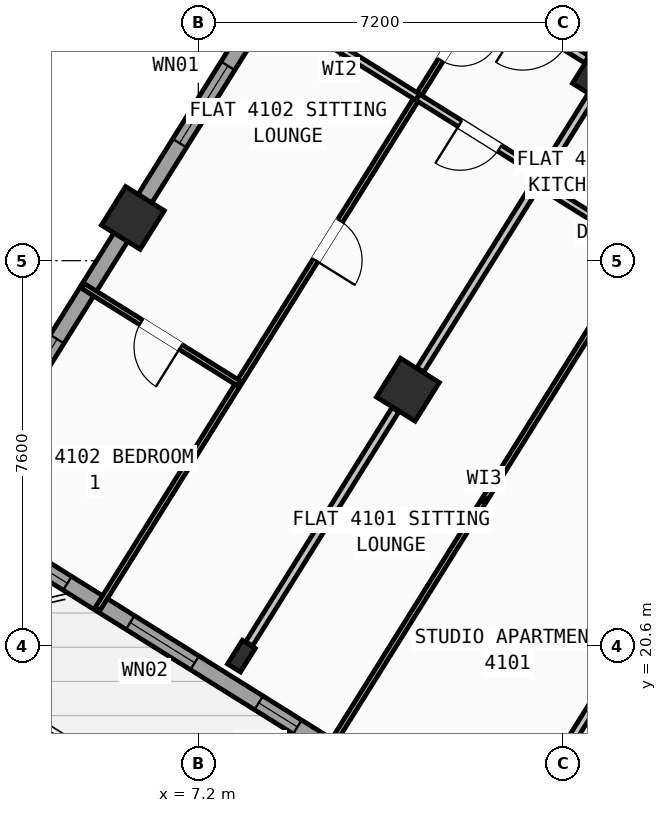
"""IFC4 building model, lengths in metres.
Left out: names, types, materials, properties, quantities, classifications, styles, units other than length and angle.
Written with IfcOpenShell. Run it as: python <this file> out.ifc"""

import sys

from ifc_helpers import new_model, si_unit, direction, frame, frame_2d, origin, origin_2d, place, context, subcontext, project, spatial, rectangle, hollow_rectangle, i_section, extrude, source, transform, mapped, element, fill, save


model = new_model("IFC4")
c1 = context("Model", 3, precision=1e-05, world=origin(), true_north=direction((0.0, 1.0)))
c2 = subcontext(c1, "Body", "Model", "MODEL_VIEW")
j1 = project(units=[si_unit("LENGTHUNIT", "METRE"), si_unit("PLANEANGLEUNIT", "RADIAN")], contexts=[c1])
p1 = place(None, origin())
s1 = spatial("IfcSite", under=j1, at=p1, CompositionType="ELEMENT")
p2 = place(p1, origin())
s2 = spatial("IfcBuilding", under=s1, at=p2, CompositionType="ELEMENT")
p3 = place(p2, frame((0.0, 0.0, 162.3)))
s3 = spatial("IfcBuildingStorey", under=s2, at=p3, CompositionType="ELEMENT", Elevation=162.3)
m1 = source(origin(), c2, "Body", "SweptSolid", [
    extrude(hollow_rectangle(XDim=0.9, YDim=0.9, WallThickness=0.036, at=origin_2d()), origin(), (0.0, 0.0, 1.0), 3.6),
])
for number, where, z_axis, x_axis in (
    (1, (15.205, 31.844, 0.0), (0.0, 0.0, 1.0), (-0.848, 0.53, 0.0)),
    (2, (11.336, 25.653, 0.0), (0.0, 0.0, 1.0), (-0.848, 0.53, 0.0)),
):
    element("IfcColumn", number, at=place(p3, frame(where, z_axis=z_axis, x_axis=x_axis)), inside=s3, PredefinedType="COLUMN", context=c2, shape_type="MappedRepresentation", body=[
        mapped(m1, transform((0.0, 0.0, 0.0), scale=1.0)),
    ])
m2 = source(origin(), c2, "Body", "SweptSolid", [
    extrude(i_section(OverallWidth=0.3, OverallDepth=0.55, WebThickness=0.015, FlangeThickness=0.029, at=origin_2d()), origin(), (0.0, 0.0, 1.0), 3.6),
])
p4 = place(p3, frame((8.051, 20.395, 0.0), z_axis=(0.0, 0.0, 1.0), x_axis=(-0.848048096156, 0.529919264233, 0.0)))
e3 = element("IfcColumn", 3, at=p4, inside=s3, PredefinedType="COLUMN", context=c2, shape_type="MappedRepresentation", body=[
    mapped(m2, transform((0.0, 0.0, 0.0), scale=1.0)),
])
p5 = place(p3, frame((5.909, 29.044, 0.0), z_axis=(0.0, 0.0, 1.0), x_axis=(-0.848048096156, 0.529919264233, 0.0)))
e4 = element("IfcColumn", 4, at=p5, inside=s3, PredefinedType="COLUMN", context=c2, shape_type="MappedRepresentation", body=[
    mapped(m1, transform((0.0, 0.0, 0.0), scale=1.0)),
])
p6 = place(p3, frame((29.268, 6.429, 0.0), z_axis=(0.0, 0.0, 1.0), x_axis=(-0.848049971435, 0.529916263149, 0.0)))
e5 = element("IfcWall", 5, at=p6, inside=s3, PredefinedType="STANDARD", context=c2, shape_type="SweptSolid", body=[
    extrude(rectangle(XDim=31.588, YDim=0.32, at=frame_2d((15.794, 0.0))), origin(), (0.0, 0.0, 1.0), 3.35),
])
p7 = place(p6, frame((16.362, 0.0, 0.0)))
e6 = element("IfcOpeningElement", 6, at=p7, cuts=e5, PredefinedType="OPENING", context=c2, shape_type="SweptSolid", body=[
    extrude(rectangle(XDim=1.2, YDim=2.15, at=frame_2d((0.6, 1.075))), frame((0.0, 0.17, 0.0), z_axis=(0.0, -1.0, 0.0), x_axis=(1.0, 0.0, 0.0)), (0.0, 0.0, 1.0), 0.34),
])
p8 = place(p6, frame((2.989, 0.0, 0.8)))
e7 = element("IfcOpeningElement", 7, at=p8, cuts=e5, PredefinedType="OPENING", context=c2, shape_type="SweptSolid", body=[
    extrude(rectangle(XDim=2.1, YDim=1.55, at=frame_2d((1.05, 0.775))), frame((0.0, 0.17, 0.0), z_axis=(0.0, -1.0, 0.0), x_axis=(1.0, 0.0, 0.0)), (0.0, 0.0, 1.0), 0.34),
])
p9 = place(p6, frame((8.359, 0.0, 0.8)))
e8 = element("IfcOpeningElement", 8, at=p9, cuts=e5, PredefinedType="OPENING", context=c2, shape_type="SweptSolid", body=[
    extrude(rectangle(XDim=2.1, YDim=1.55, at=frame_2d((1.05, 0.775))), frame((0.0, 0.17, 0.0), z_axis=(0.0, -1.0, 0.0), x_axis=(1.0, 0.0, 0.0)), (0.0, 0.0, 1.0), 0.34),
])
p10 = place(p6, frame((13.284, 0.0, 0.95)))
e9 = element("IfcOpeningElement", 9, at=p10, cuts=e5, PredefinedType="OPENING", context=c2, shape_type="SweptSolid", body=[
    extrude(rectangle(XDim=1.2, YDim=1.4, at=frame_2d((0.6, 0.7))), frame((0.0, 0.17, 0.0), z_axis=(0.0, -1.0, 0.0), x_axis=(1.0, 0.0, 0.0)), (0.0, 0.0, 1.0), 0.34),
])
p11 = place(p6, frame((20.39, 0.0, 0.95)))
e10 = element("IfcOpeningElement", 10, at=p11, cuts=e5, PredefinedType="OPENING", context=c2, shape_type="SweptSolid", body=[
    extrude(rectangle(XDim=1.2, YDim=1.4, at=frame_2d((0.6, 0.7))), frame((0.0, 0.17, 0.0), z_axis=(0.0, -1.0, 0.0), x_axis=(1.0, 0.0, 0.0)), (0.0, 0.0, 1.0), 0.34),
])
p12 = place(p6, frame((23.715, 0.0, 1.0)))
e11 = element("IfcOpeningElement", 11, at=p12, cuts=e5, PredefinedType="OPENING", context=c2, shape_type="SweptSolid", body=[
    extrude(rectangle(XDim=0.9, YDim=1.25, at=frame_2d((0.45, 0.625))), frame((0.0, 0.17, 0.0), z_axis=(0.0, -1.0, 0.0), x_axis=(1.0, 0.0, 0.0)), (0.0, 0.0, 1.0), 0.34),
])
p13 = place(p6, frame((26.106, 0.0, 0.85)))
e12 = element("IfcOpeningElement", 12, at=p13, cuts=e5, PredefinedType="OPENING", context=c2, shape_type="SweptSolid", body=[
    extrude(rectangle(XDim=1.5, YDim=1.5, at=frame_2d((0.75, 0.75))), frame((0.0, 0.17, 0.0), z_axis=(0.0, -1.0, 0.0), x_axis=(1.0, 0.0, 0.0)), (0.0, 0.0, 1.0), 0.34),
])
p14 = place(p6, frame((29.068, 0.0, 0.85)))
e13 = element("IfcOpeningElement", 13, at=p14, cuts=e5, PredefinedType="OPENING", context=c2, shape_type="SweptSolid", body=[
    extrude(rectangle(XDim=1.8, YDim=1.5, at=frame_2d((0.9, 0.75))), frame((0.0, 0.17, 0.0), z_axis=(0.0, -1.0, 0.0), x_axis=(1.0, 0.0, 0.0)), (0.0, 0.0, 1.0), 0.34),
])
p15 = place(p3, frame((2.415, 23.452, 0.0), z_axis=(0.0, 0.0, 1.0), x_axis=(0.52991049553, 0.848053575387, 0.0)))
e14 = element("IfcWall", 14, at=p15, inside=s3, PredefinedType="STANDARD", context=c2, shape_type="SweptSolid", body=[
    extrude(rectangle(XDim=21.587, YDim=0.32, at=frame_2d((10.794, 0.0))), origin(), (0.0, 0.0, 1.0), 2.775),
])
p16 = place(p15, frame((1.673, 0.0, 0.8)))
e15 = element("IfcOpeningElement", 15, at=p16, cuts=e14, PredefinedType="OPENING", context=c2, shape_type="SweptSolid", body=[
    extrude(rectangle(XDim=2.1, YDim=1.55, at=frame_2d((1.05, 0.775))), frame((0.0, 0.17, 0.0), z_axis=(0.0, -1.0, 0.0), x_axis=(1.0, 0.0, 0.0)), (0.0, 0.0, 1.0), 0.34),
])
p17 = place(p15, frame((8.334, 0.0, 0.85)))
e16 = element("IfcOpeningElement", 16, at=p17, cuts=e14, PredefinedType="OPENING", context=c2, shape_type="SweptSolid", body=[
    extrude(rectangle(XDim=1.8, YDim=1.5, at=frame_2d((0.9, 0.75))), frame((0.0, 0.17, 0.0), z_axis=(0.0, -1.0, 0.0), x_axis=(1.0, 0.0, 0.0)), (0.0, 0.0, 1.0), 0.34),
])
p18 = place(p15, frame((17.172, 0.0, 0.85)))
e17 = element("IfcOpeningElement", 17, at=p18, cuts=e14, PredefinedType="OPENING", context=c2, shape_type="SweptSolid", body=[
    extrude(rectangle(XDim=1.5, YDim=1.5, at=frame_2d((0.75, 0.75))), frame((0.0, 0.17, 0.0), z_axis=(0.0, -1.0, 0.0), x_axis=(1.0, 0.0, 0.0)), (0.0, 0.0, 1.0), 0.34),
])
p19 = place(p3, frame((14.138, 41.825, 0.0), z_axis=(0.0, 0.0, 1.0), x_axis=(0.848046498049, -0.529921821731, 0.0)))
e18 = element("IfcWall", 18, at=p19, inside=s3, PredefinedType="STANDARD", context=c2, shape_type="SweptSolid", body=[
    extrude(rectangle(XDim=31.588, YDim=0.32, at=frame_2d((15.794, 0.0))), origin(), (0.0, 0.0, 1.0), 3.35),
])
p20 = place(p19, frame((3.253, 0.0, 0.0)))
e19 = element("IfcOpeningElement", 19, at=p20, cuts=e18, PredefinedType="OPENING", context=c2, shape_type="SweptSolid", body=[
    extrude(rectangle(XDim=1.05, YDim=2.15, at=frame_2d((0.525, 1.075))), frame((0.0, 0.17, 0.0), z_axis=(0.0, -1.0, 0.0), x_axis=(1.0, 0.0, 0.0)), (0.0, 0.0, 1.0), 0.34),
])
p21 = place(p19, frame((0.863, 0.0, 0.85)))
e20 = element("IfcOpeningElement", 20, at=p21, cuts=e18, PredefinedType="OPENING", context=c2, shape_type="SweptSolid", body=[
    extrude(rectangle(XDim=1.8, YDim=1.5, at=frame_2d((0.9, 0.75))), frame((0.0, 0.17, 0.0), z_axis=(0.0, -1.0, 0.0), x_axis=(1.0, 0.0, 0.0)), (0.0, 0.0, 1.0), 0.34),
])
p22 = place(p19, frame((8.494, 0.0, 0.85)))
e21 = element("IfcOpeningElement", 21, at=p22, cuts=e18, PredefinedType="OPENING", context=c2, shape_type="SweptSolid", body=[
    extrude(rectangle(XDim=1.8, YDim=1.5, at=frame_2d((0.9, 0.75))), frame((0.0, 0.17, 0.0), z_axis=(0.0, -1.0, 0.0), x_axis=(1.0, 0.0, 0.0)), (0.0, 0.0, 1.0), 0.34),
])
p23 = place(p19, frame((13.874, 0.0, 0.85)))
e22 = element("IfcOpeningElement", 22, at=p23, cuts=e18, PredefinedType="OPENING", context=c2, shape_type="SweptSolid", body=[
    extrude(rectangle(XDim=1.5, YDim=1.5, at=frame_2d((0.75, 0.75))), frame((0.0, 0.17, 0.0), z_axis=(0.0, -1.0, 0.0), x_axis=(1.0, 0.0, 0.0)), (0.0, 0.0, 1.0), 0.34),
])
p24 = place(p19, frame((17.104, 0.0, 1.0)))
e23 = element("IfcOpeningElement", 23, at=p24, cuts=e18, PredefinedType="OPENING", context=c2, shape_type="SweptSolid", body=[
    extrude(rectangle(XDim=0.9, YDim=1.25, at=frame_2d((0.45, 0.625))), frame((0.0, 0.17, 0.0), z_axis=(0.0, -1.0, 0.0), x_axis=(1.0, 0.0, 0.0)), (0.0, 0.0, 1.0), 0.34),
])
p25 = place(p19, frame((22.144, 0.0, 1.0)))
e24 = element("IfcOpeningElement", 24, at=p25, cuts=e18, PredefinedType="OPENING", context=c2, shape_type="SweptSolid", body=[
    extrude(rectangle(XDim=0.9, YDim=1.25, at=frame_2d((0.45, 0.625))), frame((0.0, 0.17, 0.0), z_axis=(0.0, -1.0, 0.0), x_axis=(1.0, 0.0, 0.0)), (0.0, 0.0, 1.0), 0.34),
])
p26 = place(p19, frame((27.744, 0.0, 1.0)))
e25 = element("IfcOpeningElement", 25, at=p26, cuts=e18, PredefinedType="OPENING", context=c2, shape_type="SweptSolid", body=[
    extrude(rectangle(XDim=0.9, YDim=1.25, at=frame_2d((0.45, 0.625))), frame((0.0, 0.17, 0.0), z_axis=(0.0, -1.0, 0.0), x_axis=(1.0, 0.0, 0.0)), (0.0, 0.0, 1.0), 0.34),
])
p27 = place(p3, frame((25.065, 28.394, 0.0), z_axis=(0.0, 0.0, 1.0), x_axis=(-0.848048310262, 0.529918921593, 0.0)))
e26 = element("IfcWall", 26, at=p27, inside=s3, PredefinedType="PARTITIONING", context=c2, shape_type="SweptSolid", body=[
    extrude(rectangle(XDim=16.73, YDim=0.16, at=frame_2d((8.365, 0.0))), origin(), (0.0, 0.0, 1.0), 3.34),
])
p28 = place(p27, frame((2.22, 0.0, 0.0)))
e27 = element("IfcOpeningElement", 27, at=p28, cuts=e26, PredefinedType="OPENING", context=c2, shape_type="SweptSolid", body=[
    extrude(rectangle(XDim=0.86, YDim=2.05, at=frame_2d((0.43, 1.025))), frame((0.0, 0.09, 0.0), z_axis=(0.0, -1.0, 0.0), x_axis=(1.0, 0.0, 0.0)), (0.0, 0.0, 1.0), 0.18),
])
p29 = place(p27, frame((7.82, 0.0, 0.0)))
e28 = element("IfcOpeningElement", 28, at=p29, cuts=e26, PredefinedType="OPENING", context=c2, shape_type="SweptSolid", body=[
    extrude(rectangle(XDim=1.0, YDim=2.1, at=frame_2d((0.5, 1.05))), frame((0.0, 0.09, 0.0), z_axis=(0.0, -1.0, 0.0), x_axis=(1.0, 0.0, 0.0)), (0.0, 0.0, 1.0), 0.18),
])
p30 = place(p27, frame((12.95, 0.0, 0.0)))
e29 = element("IfcOpeningElement", 29, at=p30, cuts=e26, PredefinedType="OPENING", context=c2, shape_type="SweptSolid", body=[
    extrude(rectangle(XDim=1.0, YDim=2.1, at=frame_2d((0.5, 1.05))), frame((0.0, 0.09, 0.0), z_axis=(0.0, -1.0, 0.0), x_axis=(1.0, 0.0, 0.0)), (0.0, 0.0, 1.0), 0.18),
])
p31 = place(p3, frame((14.866, 32.173, 0.0), z_axis=(0.0, 0.0, 1.0), x_axis=(-0.848053401719, 0.529910773464, 0.0)))
e30 = element("IfcWall", 30, at=p31, inside=s3, PredefinedType="PARTITIONING", context=c2, shape_type="SweptSolid", body=[
    extrude(rectangle(XDim=5.476, YDim=0.16, at=frame_2d((2.738, 0.0))), origin(), (0.0, 0.0, 1.0), 2.775),
])
p32 = place(p31, frame((0.488, 0.0, 0.0)))
e31 = element("IfcOpeningElement", 31, at=p32, cuts=e30, PredefinedType="OPENING", context=c2, shape_type="SweptSolid", body=[
    extrude(rectangle(XDim=1.0, YDim=2.1, at=frame_2d((0.5, 1.05))), frame((0.0, 0.09, 0.0), z_axis=(0.0, -1.0, 0.0), x_axis=(1.0, 0.0, 0.0)), (0.0, 0.0, 1.0), 0.18),
])
p33 = place(p3, frame((16.519, 21.87, 0.0), z_axis=(0.0, 0.0, 1.0), x_axis=(-0.529922447305, -0.848046107144, 0.0)))
e32 = element("IfcWall", 32, at=p33, inside=s3, PredefinedType="PARTITIONING", context=c2, shape_type="SweptSolid", body=[
    extrude(rectangle(XDim=5.451, YDim=0.16, at=frame_2d((2.726, 0.0))), origin(), (0.0, 0.0, 1.0), 2.775),
])
p34 = place(p3, frame((14.96, 31.452, 0.0), z_axis=(0.0, 0.0, 1.0), x_axis=(-0.529947310719, -0.848030570122, 0.0)))
e33 = element("IfcWall", 33, at=p34, inside=s3, PredefinedType="PARTITIONING", context=c2, shape_type="SweptSolid", body=[
    extrude(rectangle(XDim=6.376, YDim=0.16, at=frame_2d((3.188, 0.0))), origin(), (0.0, 0.0, 1.0), 2.775),
])
p35 = place(p3, frame((11.091, 25.261, 0.0), z_axis=(0.0, 0.0, 1.0), x_axis=(-0.52994257524, -0.848033529377, 0.0)))
e34 = element("IfcWall", 34, at=p35, inside=s3, PredefinedType="PARTITIONING", context=c2, shape_type="SweptSolid", body=[
    extrude(rectangle(XDim=5.451, YDim=0.16, at=frame_2d((2.726, 0.0))), origin(), (0.0, 0.0, 1.0), 2.775),
])
p36 = place(p3, frame((19.318, 26.349, 0.0), z_axis=(0.0, 0.0, 1.0), x_axis=(-0.848039019877, 0.529933789039, 0.0)))
e35 = element("IfcWall", 35, at=p36, inside=s3, PredefinedType="PLUMBINGWALL", context=c2, shape_type="SweptSolid", body=[
    extrude(rectangle(XDim=6.4, YDim=0.14, at=frame_2d((3.2, 0.0))), origin(), (0.0, 0.0, 1.0), 3.34),
])
p37 = place(p36, frame((2.824, 0.0, 0.0)))
e36 = element("IfcOpeningElement", 36, at=p37, cuts=e35, PredefinedType="OPENING", context=c2, shape_type="SweptSolid", body=[
    extrude(rectangle(XDim=0.78, YDim=2.05, at=frame_2d((0.39, 1.025))), frame((0.0, 0.08, 0.0), z_axis=(0.0, -1.0, 0.0), x_axis=(1.0, 0.0, 0.0)), (0.0, 0.0, 1.0), 0.16),
])
p38 = place(p3, frame((15.953, 28.452, 0.0), z_axis=(0.0, 0.0, 1.0), x_axis=(-0.529931645041, -0.848040359643, 0.0)))
e37 = element("IfcWall", 37, at=p38, inside=s3, PredefinedType="PARTITIONING", context=c2, shape_type="SweptSolid", body=[
    extrude(rectangle(XDim=11.74, YDim=0.11, at=frame_2d((5.87, 0.0))), origin(), (0.0, 0.0, 1.0), 3.34),
])
p39 = place(p38, frame((0.35, 0.0, 0.0)))
e38 = element("IfcOpeningElement", 38, at=p39, cuts=e37, PredefinedType="OPENING", context=c2, shape_type="SweptSolid", body=[
    extrude(rectangle(XDim=0.92, YDim=2.08, at=frame_2d((0.46, 1.04))), frame((0.0, 0.065, 0.0), z_axis=(0.0, -1.0, 0.0), x_axis=(1.0, 0.0, 0.0)), (0.0, 0.0, 1.0), 0.13),
])
p40 = place(p3, frame((12.798, 33.465, 0.0), z_axis=(0.0, 0.0, 1.0), x_axis=(-0.529916182913, -0.848050021571, 0.0)))
e39 = element("IfcWall", 39, at=p40, inside=s3, PredefinedType="PARTITIONING", context=c2, shape_type="SweptSolid", body=[
    extrude(rectangle(XDim=14.32, YDim=0.11, at=frame_2d((7.16, 0.0))), origin(), (0.0, 0.0, 1.0), 3.34),
])
p41 = place(p40, frame((0.76, 0.0, 0.0)))
e40 = element("IfcOpeningElement", 40, at=p41, cuts=e39, PredefinedType="OPENING", context=c2, shape_type="SweptSolid", body=[
    extrude(rectangle(XDim=0.78, YDim=2.05, at=frame_2d((0.39, 1.025))), frame((0.0, 0.065, 0.0), z_axis=(0.0, -1.0, 0.0), x_axis=(1.0, 0.0, 0.0)), (0.0, 0.0, 1.0), 0.13),
])
p42 = place(p40, frame((5.281, 0.0, 0.0)))
e41 = element("IfcOpeningElement", 41, at=p42, cuts=e39, PredefinedType="OPENING", context=c2, shape_type="SweptSolid", body=[
    extrude(rectangle(XDim=0.92, YDim=2.08, at=frame_2d((0.46, 1.04))), frame((0.0, 0.065, 0.0), z_axis=(0.0, -1.0, 0.0), x_axis=(1.0, 0.0, 0.0)), (0.0, 0.0, 1.0), 0.13),
])
p43 = place(p3, frame((13.986, 29.893, 0.0), z_axis=(0.0, 0.0, 1.0), x_axis=(-0.84802195137, 0.529961102341, 0.0)))
e42 = element("IfcWall", 42, at=p43, inside=s3, PredefinedType="PLUMBINGWALL", context=c2, shape_type="SweptSolid", body=[
    extrude(rectangle(XDim=2.9, YDim=0.14, at=frame_2d((1.45, 0.0))), origin(), (0.0, 0.0, 1.0), 3.34),
])
p44 = place(p43, frame((0.99, 0.0, 0.0)))
e43 = element("IfcOpeningElement", 43, at=p44, cuts=e42, PredefinedType="OPENING", context=c2, shape_type="SweptSolid", body=[
    extrude(rectangle(XDim=0.92, YDim=2.08, at=frame_2d((0.46, 1.04))), frame((0.0, 0.08, 0.0), z_axis=(0.0, -1.0, 0.0), x_axis=(1.0, 0.0, 0.0)), (0.0, 0.0, 1.0), 0.16),
])
p45 = place(p3, frame((11.526, 31.43, 0.0), z_axis=(0.0, 0.0, 1.0), x_axis=(-0.848051346257, 0.52991406295, 0.0)))
e44 = element("IfcWall", 44, at=p45, inside=s3, PredefinedType="PLUMBINGWALL", context=c2, shape_type="SweptSolid", body=[
    extrude(rectangle(XDim=3.62, YDim=0.14, at=frame_2d((1.81, 0.0))), origin(), (0.0, 0.0, 1.0), 3.34),
])
p46 = place(p3, frame((7.997, 25.781, 0.0), z_axis=(0.0, 0.0, 1.0), x_axis=(-0.848051346257, 0.52991406295, 0.0)))
e45 = element("IfcWall", 45, at=p46, inside=s3, PredefinedType="PARTITIONING", context=c2, shape_type="SweptSolid", body=[
    extrude(rectangle(XDim=3.62, YDim=0.11, at=frame_2d((1.81, 0.0))), origin(), (0.0, 0.0, 1.0), 3.34),
])
p47 = place(p46, frame((1.35, 0.0, 0.0)))
e46 = element("IfcOpeningElement", 46, at=p47, cuts=e45, PredefinedType="OPENING", context=c2, shape_type="SweptSolid", body=[
    extrude(rectangle(XDim=0.92, YDim=2.08, at=frame_2d((0.46, 1.04))), frame((0.0, 0.065, 0.0), z_axis=(0.0, -1.0, 0.0), x_axis=(1.0, 0.0, 0.0)), (0.0, 0.0, 1.0), 0.13),
])
m3 = source(origin(), c2, "Body", "SweptSolid", [
    extrude(rectangle(XDim=0.9, YDim=1.25, at=frame_2d((0.45, 0.625))), frame((0.0, 0.03, 0.0), z_axis=(0.0, -1.0, 0.0), x_axis=(1.0, 0.0, 0.0)), (0.0, 0.0, 1.0), 0.06),
])
p48 = place(p12, origin())
e47 = element("IfcWindow", 47, at=p48, inside=s3, PartitioningType="SINGLE_PANEL", PredefinedType="WINDOW", context=c2, shape_type="MappedRepresentation", body=[
    mapped(m3, transform((0.0, 0.0, 0.0), scale=1.0)),
])
fill(e11, e47)
m4 = source(origin(), c2, "Body", "SweptSolid", [
    extrude(rectangle(XDim=1.5, YDim=1.5, at=frame_2d((0.75, 0.75))), frame((0.0, 0.03, 0.0), z_axis=(0.0, -1.0, 0.0), x_axis=(1.0, 0.0, 0.0)), (0.0, 0.0, 1.0), 0.06),
])
p49 = place(p13, origin())
e48 = element("IfcWindow", 48, at=p49, inside=s3, PartitioningType="SINGLE_PANEL", PredefinedType="WINDOW", context=c2, shape_type="MappedRepresentation", body=[
    mapped(m4, transform((0.0, 0.0, 0.0), scale=1.0)),
])
fill(e12, e48)
m5 = source(origin(), c2, "Body", "SweptSolid", [
    extrude(rectangle(XDim=1.8, YDim=1.5, at=frame_2d((0.9, 0.75))), frame((0.0, 0.03, 0.0), z_axis=(0.0, -1.0, 0.0), x_axis=(1.0, 0.0, 0.0)), (0.0, 0.0, 1.0), 0.06),
])
p50 = place(p14, origin())
e49 = element("IfcWindow", 49, at=p50, inside=s3, PartitioningType="SINGLE_PANEL", PredefinedType="WINDOW", context=c2, shape_type="MappedRepresentation", body=[
    mapped(m5, transform((0.0, 0.0, 0.0), scale=1.0)),
])
fill(e13, e49)
m6 = source(origin(), c2, "Body", "SweptSolid", [
    extrude(rectangle(XDim=2.1, YDim=1.55, at=frame_2d((1.05, 0.775))), frame((0.0, 0.03, 0.0), z_axis=(0.0, -1.0, 0.0), x_axis=(1.0, 0.0, 0.0)), (0.0, 0.0, 1.0), 0.06),
])
p51 = place(p16, origin())
e50 = element("IfcWindow", 50, at=p51, inside=s3, PartitioningType="SINGLE_PANEL", PredefinedType="WINDOW", context=c2, shape_type="MappedRepresentation", body=[
    mapped(m6, transform((0.0, 0.0, 0.0), scale=1.0)),
])
fill(e15, e50)
p52 = place(p17, origin())
e51 = element("IfcWindow", 51, at=p52, inside=s3, PartitioningType="SINGLE_PANEL", PredefinedType="WINDOW", context=c2, shape_type="MappedRepresentation", body=[
    mapped(m5, transform((0.0, 0.0, 0.0), scale=1.0)),
])
fill(e16, e51)
m7 = source(origin(), c2, "Body", "SweptSolid", [
    extrude(rectangle(XDim=0.92, YDim=2.08, at=frame_2d((0.46, 1.04))), frame((0.0, 0.025, 0.0), z_axis=(0.0, -1.0, 0.0), x_axis=(1.0, 0.0, 0.0)), (0.0, 0.0, 1.0), 0.05),
])
p53 = place(p44, origin())
e52 = element("IfcDoor", 52, at=p53, inside=s3, OperationType="SINGLE_SWING_RIGHT", PredefinedType="DOOR", context=c2, shape_type="MappedRepresentation", body=[
    mapped(m7, transform((0.0, 0.0, 0.0), scale=1.0)),
])
fill(e43, e52)
m8 = source(origin(), c2, "Body", "SweptSolid", [
    extrude(rectangle(XDim=0.78, YDim=2.05, at=frame_2d((0.39, 1.025))), frame((0.0, 0.025, 0.0), z_axis=(0.0, -1.0, 0.0), x_axis=(1.0, 0.0, 0.0)), (0.0, 0.0, 1.0), 0.05),
])
p54 = place(p41, origin())
e53 = element("IfcDoor", 53, at=p54, inside=s3, OperationType="SINGLE_SWING_LEFT", PredefinedType="DOOR", context=c2, shape_type="MappedRepresentation", body=[
    mapped(m8, transform((0.0, 0.0, 0.0), scale=1.0)),
])
fill(e40, e53)
p55 = place(p42, origin())
e54 = element("IfcDoor", 54, at=p55, inside=s3, OperationType="SINGLE_SWING_RIGHT", PredefinedType="DOOR", context=c2, shape_type="MappedRepresentation", body=[
    mapped(m7, transform((0.0, 0.0, 0.0), scale=1.0)),
])
fill(e41, e54)
p56 = place(p47, origin())
e55 = element("IfcDoor", 55, at=p56, inside=s3, OperationType="SINGLE_SWING_LEFT", PredefinedType="DOOR", context=c2, shape_type="MappedRepresentation", body=[
    mapped(m7, transform((0.0, 0.0, 0.0), scale=1.0)),
])
fill(e46, e55)
save(model, sys.argv[1])
